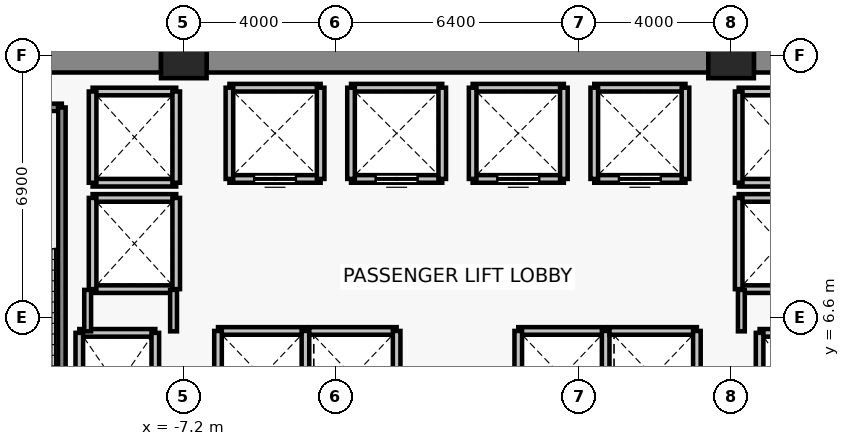
"""IFC4 building model, lengths in metres.
Left out: names, types, materials, properties, quantities, classifications, styles, units other than length and angle.
Written with IfcOpenShell. Run it as: python <this file> out.ifc"""

import sys

from ifc_helpers import new_model, si_unit, direction, frame, frame_2d, origin, origin_2d, place, context, subcontext, project, spatial, rectangle, extrude, source, transform, mapped, element, fill, save


model = new_model("IFC4")
c1 = context("Model", 3, precision=1e-05, world=origin(), true_north=direction((0.0, 1.0)))
c2 = subcontext(c1, "Body", "Model", "MODEL_VIEW")
j1 = project(units=[si_unit("LENGTHUNIT", "METRE"), si_unit("PLANEANGLEUNIT", "RADIAN")], contexts=[c1])
p1 = place(None, origin())
s1 = spatial("IfcSite", under=j1, at=p1, CompositionType="ELEMENT")
p2 = place(p1, origin())
s2 = spatial("IfcBuilding", under=s1, at=p2, CompositionType="ELEMENT")
p3 = place(p2, frame((0.0, 0.0, 13.8)))
s3 = spatial("IfcBuildingStorey", under=s2, at=p3, CompositionType="ELEMENT", Elevation=13.8)
for number, where, z_axis, x_axis in (
    (1, (-7.2, 13.5, 0.0), (0.0, 0.0, 1.0), (1.0, 0.0, 0.0)),
    (2, (7.2, 13.5, 0.0), (0.0, 0.0, 1.0), (1.0, 0.0, 0.0)),
):
    element("IfcColumn", number, at=place(p3, frame(where, z_axis=z_axis, x_axis=x_axis)), inside=s3, PredefinedType="COLUMN", context=c2, shape_type="SweptSolid", body=[
        extrude(rectangle(XDim=1.2, YDim=1.2, at=origin_2d()), origin(), (0.0, 0.0, 1.0), 4.4),
    ])
p4 = place(p3, frame((-13.8, 13.5, 0.0), z_axis=(0.0, 0.0, 1.0), x_axis=(1.0, 0.0, 0.0)))
e3 = element("IfcWall", 3, at=p4, inside=s3, PredefinedType="SHEAR", context=c2, shape_type="SweptSolid", body=[
    extrude(rectangle(XDim=6.0, YDim=0.9, at=frame_2d((3.0, 0.0))), origin(), (0.0, 0.0, 1.0), 4.1),
])
p5 = place(p3, frame((-6.6, 13.5, 0.0), z_axis=(0.0, 0.0, 1.0), x_axis=(1.0, 0.0, 0.0)))
e4 = element("IfcWall", 4, at=p5, inside=s3, PredefinedType="SHEAR", context=c2, shape_type="SweptSolid", body=[
    extrude(rectangle(XDim=13.2, YDim=0.9, at=frame_2d((6.6, 0.0))), origin(), (0.0, 0.0, 1.0), 4.1),
])
p6 = place(p3, frame((7.8, 13.5, 0.0), z_axis=(0.0, 0.0, 1.0), x_axis=(1.0, 0.0, 0.0)))
e5 = element("IfcWall", 5, at=p6, inside=s3, PredefinedType="SHEAR", context=c2, shape_type="SweptSolid", body=[
    extrude(rectangle(XDim=6.0, YDim=0.9, at=frame_2d((3.0, 0.0))), origin(), (0.0, 0.0, 1.0), 4.1),
])
p7 = place(p3, frame((-9.95, 6.2, 0.0), z_axis=(0.0, 0.0, 1.0), x_axis=(1.0, 0.0, 0.0)))
e6 = element("IfcWall", 6, at=p7, inside=s3, PredefinedType="SOLIDWALL", context=c2, shape_type="SweptSolid", body=[
    extrude(rectangle(XDim=2.0, YDim=0.2, at=frame_2d((1.0, 0.0))), origin(), (0.0, 0.0, 1.0), 4.1),
])
for number, where, z_axis, x_axis in (
    (7, (-9.95, 3.4, 0.0), (0.0, 0.0, 1.0), (0.0, 1.0, 0.0)),
    (8, (-7.95, 6.2, 0.0), (0.0, 0.0, 1.0), (0.0, -1.0, 0.0)),
):
    element("IfcWall", number, at=place(p3, frame(where, z_axis=z_axis, x_axis=x_axis)), inside=s3, PredefinedType="SOLIDWALL", context=c2, shape_type="SweptSolid", body=[
        extrude(rectangle(XDim=2.8, YDim=0.2, at=frame_2d((1.4, 0.0))), origin(), (0.0, 0.0, 1.0), 4.1),
    ])
p8 = place(p3, frame((7.95, 6.2, 0.0), z_axis=(0.0, 0.0, 1.0), x_axis=(1.0, 0.0, 0.0)))
e9 = element("IfcWall", 9, at=p8, inside=s3, PredefinedType="SOLIDWALL", context=c2, shape_type="SweptSolid", body=[
    extrude(rectangle(XDim=2.0, YDim=0.2, at=frame_2d((1.0, 0.0))), origin(), (0.0, 0.0, 1.0), 4.1),
])
p9 = place(p3, frame((7.95, 3.4, 0.0), z_axis=(0.0, 0.0, 1.0), x_axis=(0.0, 1.0, 0.0)))
e10 = element("IfcWall", 10, at=p9, inside=s3, PredefinedType="SOLIDWALL", context=c2, shape_type="SweptSolid", body=[
    extrude(rectangle(XDim=2.8, YDim=0.2, at=frame_2d((1.4, 0.0))), origin(), (0.0, 0.0, 1.0), 4.1),
])
p10 = place(p3, frame((-3.6, 10.25, 0.0), z_axis=(0.0, 0.0, 1.0), x_axis=(-1.0, 0.0, 0.0)))
e11 = element("IfcWall", 11, at=p10, inside=s3, PredefinedType="SOLIDWALL", context=c2, shape_type="SweptSolid", body=[
    extrude(rectangle(XDim=2.4, YDim=0.2, at=frame_2d((1.2, 0.0))), origin(), (0.0, 0.0, 1.0), 4.1),
])
p11 = place(p10, frame((0.65, 0.0, 0.0)))
e12 = element("IfcOpeningElement", 12, at=p11, cuts=e11, PredefinedType="OPENING", context=c2, shape_type="SweptSolid", body=[
    extrude(rectangle(XDim=1.1, YDim=2.2, at=frame_2d((0.55, 1.1))), frame((0.0, 0.11, 0.0), z_axis=(0.0, -1.0, 0.0), x_axis=(1.0, 0.0, 0.0)), (0.0, 0.0, 1.0), 0.22),
])
for number, where, z_axis, x_axis in (
    (13, (-6.0, 12.65, 0.0), (0.0, 0.0, 1.0), (1.0, 0.0, 0.0)),
    (14, (-6.0, 10.25, 0.0), (0.0, 0.0, 1.0), (0.0, 1.0, 0.0)),
    (15, (-3.6, 12.65, 0.0), (0.0, 0.0, 1.0), (0.0, -1.0, 0.0)),
):
    element("IfcWall", number, at=place(p3, frame(where, z_axis=z_axis, x_axis=x_axis)), inside=s3, PredefinedType="SOLIDWALL", context=c2, shape_type="SweptSolid", body=[
        extrude(rectangle(XDim=2.4, YDim=0.2, at=frame_2d((1.2, 0.0))), origin(), (0.0, 0.0, 1.0), 4.1),
    ])
p12 = place(p3, frame((-0.4, 10.25, 0.0), z_axis=(0.0, 0.0, 1.0), x_axis=(-1.0, 0.0, 0.0)))
e16 = element("IfcWall", 16, at=p12, inside=s3, PredefinedType="SOLIDWALL", context=c2, shape_type="SweptSolid", body=[
    extrude(rectangle(XDim=2.4, YDim=0.2, at=frame_2d((1.2, 0.0))), origin(), (0.0, 0.0, 1.0), 4.1),
])
p13 = place(p12, frame((0.65, 0.0, 0.0)))
e17 = element("IfcOpeningElement", 17, at=p13, cuts=e16, PredefinedType="OPENING", context=c2, shape_type="SweptSolid", body=[
    extrude(rectangle(XDim=1.1, YDim=2.2, at=frame_2d((0.55, 1.1))), frame((0.0, 0.11, 0.0), z_axis=(0.0, -1.0, 0.0), x_axis=(1.0, 0.0, 0.0)), (0.0, 0.0, 1.0), 0.22),
])
p14 = place(p3, frame((-2.8, 12.65, 0.0), z_axis=(0.0, 0.0, 1.0), x_axis=(1.0, 0.0, 0.0)))
e18 = element("IfcWall", 18, at=p14, inside=s3, PredefinedType="SOLIDWALL", context=c2, shape_type="SweptSolid", body=[
    extrude(rectangle(XDim=2.4, YDim=0.2, at=frame_2d((1.2, 0.0))), origin(), (0.0, 0.0, 1.0), 4.1),
])
for number, where, z_axis, x_axis in (
    (19, (-2.8, 10.25, 0.0), (0.0, 0.0, 1.0), (0.0, 1.0, 0.0)),
    (20, (-0.4, 12.65, 0.0), (0.0, 0.0, 1.0), (0.0, -1.0, 0.0)),
):
    element("IfcWall", number, at=place(p3, frame(where, z_axis=z_axis, x_axis=x_axis)), inside=s3, PredefinedType="SOLIDWALL", context=c2, shape_type="SweptSolid", body=[
        extrude(rectangle(XDim=2.4, YDim=0.2, at=frame_2d((1.2, 0.0))), origin(), (0.0, 0.0, 1.0), 4.1),
    ])
p15 = place(p3, frame((2.8, 10.25, 0.0), z_axis=(0.0, 0.0, 1.0), x_axis=(-1.0, 0.0, 0.0)))
e21 = element("IfcWall", 21, at=p15, inside=s3, PredefinedType="SOLIDWALL", context=c2, shape_type="SweptSolid", body=[
    extrude(rectangle(XDim=2.4, YDim=0.2, at=frame_2d((1.2, 0.0))), origin(), (0.0, 0.0, 1.0), 4.1),
])
p16 = place(p15, frame((0.65, 0.0, 0.0)))
e22 = element("IfcOpeningElement", 22, at=p16, cuts=e21, PredefinedType="OPENING", context=c2, shape_type="SweptSolid", body=[
    extrude(rectangle(XDim=1.1, YDim=2.2, at=frame_2d((0.55, 1.1))), frame((0.0, 0.11, 0.0), z_axis=(0.0, -1.0, 0.0), x_axis=(1.0, 0.0, 0.0)), (0.0, 0.0, 1.0), 0.22),
])
p17 = place(p3, frame((0.4, 12.65, 0.0), z_axis=(0.0, 0.0, 1.0), x_axis=(1.0, 0.0, 0.0)))
e23 = element("IfcWall", 23, at=p17, inside=s3, PredefinedType="SOLIDWALL", context=c2, shape_type="SweptSolid", body=[
    extrude(rectangle(XDim=2.4, YDim=0.2, at=frame_2d((1.2, 0.0))), origin(), (0.0, 0.0, 1.0), 4.1),
])
for number, where, z_axis, x_axis in (
    (24, (0.4, 10.25, 0.0), (0.0, 0.0, 1.0), (0.0, 1.0, 0.0)),
    (25, (2.8, 12.65, 0.0), (0.0, 0.0, 1.0), (0.0, -1.0, 0.0)),
):
    element("IfcWall", number, at=place(p3, frame(where, z_axis=z_axis, x_axis=x_axis)), inside=s3, PredefinedType="SOLIDWALL", context=c2, shape_type="SweptSolid", body=[
        extrude(rectangle(XDim=2.4, YDim=0.2, at=frame_2d((1.2, 0.0))), origin(), (0.0, 0.0, 1.0), 4.1),
    ])
p18 = place(p3, frame((6.0, 10.25, 0.0), z_axis=(0.0, 0.0, 1.0), x_axis=(-1.0, 0.0, 0.0)))
e26 = element("IfcWall", 26, at=p18, inside=s3, PredefinedType="SOLIDWALL", context=c2, shape_type="SweptSolid", body=[
    extrude(rectangle(XDim=2.4, YDim=0.2, at=frame_2d((1.2, 0.0))), origin(), (0.0, 0.0, 1.0), 4.1),
])
p19 = place(p18, frame((0.65, 0.0, 0.0)))
e27 = element("IfcOpeningElement", 27, at=p19, cuts=e26, PredefinedType="OPENING", context=c2, shape_type="SweptSolid", body=[
    extrude(rectangle(XDim=1.1, YDim=2.2, at=frame_2d((0.55, 1.1))), frame((0.0, 0.11, 0.0), z_axis=(0.0, -1.0, 0.0), x_axis=(1.0, 0.0, 0.0)), (0.0, 0.0, 1.0), 0.22),
])
for number, where, z_axis, x_axis in (
    (28, (3.6, 12.65, 0.0), (0.0, 0.0, 1.0), (1.0, 0.0, 0.0)),
    (29, (3.6, 10.25, 0.0), (0.0, 0.0, 1.0), (0.0, 1.0, 0.0)),
    (30, (6.0, 12.65, 0.0), (0.0, 0.0, 1.0), (0.0, -1.0, 0.0)),
):
    element("IfcWall", number, at=place(p3, frame(where, z_axis=z_axis, x_axis=x_axis)), inside=s3, PredefinedType="SOLIDWALL", context=c2, shape_type="SweptSolid", body=[
        extrude(rectangle(XDim=2.4, YDim=0.2, at=frame_2d((1.2, 0.0))), origin(), (0.0, 0.0, 1.0), 4.1),
    ])
p20 = place(p3, frame((-6.3, 6.25, 0.0), z_axis=(0.0, 0.0, 1.0), x_axis=(1.0, 0.0, 0.0)))
e31 = element("IfcWall", 31, at=p20, inside=s3, PredefinedType="SOLIDWALL", context=c2, shape_type="SweptSolid", body=[
    extrude(rectangle(XDim=2.3, YDim=0.2, at=frame_2d((1.15, 0.0))), origin(), (0.0, 0.0, 1.0), 4.1),
])
for number, where, z_axis, x_axis in (
    (32, (-6.3, 3.85, 0.0), (0.0, 0.0, 1.0), (0.0, 1.0, 0.0)),
    (33, (-4.0, 6.25, 0.0), (0.0, 0.0, 1.0), (0.0, -1.0, 0.0)),
):
    element("IfcWall", number, at=place(p3, frame(where, z_axis=z_axis, x_axis=x_axis)), inside=s3, PredefinedType="SOLIDWALL", context=c2, shape_type="SweptSolid", body=[
        extrude(rectangle(XDim=2.4, YDim=0.2, at=frame_2d((1.2, 0.0))), origin(), (0.0, 0.0, 1.0), 4.1),
    ])
p21 = place(p3, frame((-3.9, 6.25, 0.0), z_axis=(0.0, 0.0, 1.0), x_axis=(1.0, 0.0, 0.0)))
e34 = element("IfcWall", 34, at=p21, inside=s3, PredefinedType="SOLIDWALL", context=c2, shape_type="SweptSolid", body=[
    extrude(rectangle(XDim=2.3, YDim=0.2, at=frame_2d((1.15, 0.0))), origin(), (0.0, 0.0, 1.0), 4.1),
])
p22 = place(p3, frame((-1.6, 6.25, 0.0), z_axis=(0.0, 0.0, 1.0), x_axis=(0.0, -1.0, 0.0)))
e35 = element("IfcWall", 35, at=p22, inside=s3, PredefinedType="SOLIDWALL", context=c2, shape_type="SweptSolid", body=[
    extrude(rectangle(XDim=2.4, YDim=0.2, at=frame_2d((1.2, 0.0))), origin(), (0.0, 0.0, 1.0), 4.1),
])
p23 = place(p3, frame((1.6, 6.25, 0.0), z_axis=(0.0, 0.0, 1.0), x_axis=(1.0, 0.0, 0.0)))
e36 = element("IfcWall", 36, at=p23, inside=s3, PredefinedType="SOLIDWALL", context=c2, shape_type="SweptSolid", body=[
    extrude(rectangle(XDim=2.3, YDim=0.2, at=frame_2d((1.15, 0.0))), origin(), (0.0, 0.0, 1.0), 4.1),
])
for number, where, z_axis, x_axis in (
    (37, (1.6, 3.85, 0.0), (0.0, 0.0, 1.0), (0.0, 1.0, 0.0)),
    (38, (3.9, 6.25, 0.0), (0.0, 0.0, 1.0), (0.0, -1.0, 0.0)),
):
    element("IfcWall", number, at=place(p3, frame(where, z_axis=z_axis, x_axis=x_axis)), inside=s3, PredefinedType="SOLIDWALL", context=c2, shape_type="SweptSolid", body=[
        extrude(rectangle(XDim=2.4, YDim=0.2, at=frame_2d((1.2, 0.0))), origin(), (0.0, 0.0, 1.0), 4.1),
    ])
p24 = place(p3, frame((4.0, 6.25, 0.0), z_axis=(0.0, 0.0, 1.0), x_axis=(1.0, 0.0, 0.0)))
e39 = element("IfcWall", 39, at=p24, inside=s3, PredefinedType="SOLIDWALL", context=c2, shape_type="SweptSolid", body=[
    extrude(rectangle(XDim=2.3, YDim=0.2, at=frame_2d((1.15, 0.0))), origin(), (0.0, 0.0, 1.0), 4.1),
])
p25 = place(p3, frame((6.3, 6.25, 0.0), z_axis=(0.0, 0.0, 1.0), x_axis=(0.0, -1.0, 0.0)))
e40 = element("IfcWall", 40, at=p25, inside=s3, PredefinedType="SOLIDWALL", context=c2, shape_type="SweptSolid", body=[
    extrude(rectangle(XDim=2.4, YDim=0.2, at=frame_2d((1.2, 0.0))), origin(), (0.0, 0.0, 1.0), 4.1),
])
for number, where, z_axis, x_axis in (
    (41, (-7.4, 7.35, 0.0), (0.0, 0.0, 1.0), (-1.0, 0.0, 0.0)),
    (42, (-9.6, 9.75, 0.0), (0.0, 0.0, 1.0), (1.0, 0.0, 0.0)),
):
    element("IfcWall", number, at=place(p3, frame(where, z_axis=z_axis, x_axis=x_axis)), inside=s3, PredefinedType="SOLIDWALL", context=c2, shape_type="SweptSolid", body=[
        extrude(rectangle(XDim=2.2, YDim=0.2, at=frame_2d((1.1, 0.0))), origin(), (0.0, 0.0, 1.0), 3.19),
    ])
p26 = place(p3, frame((-9.6, 7.35, 0.0), z_axis=(0.0, 0.0, 1.0), x_axis=(0.0, 1.0, 0.0)))
e43 = element("IfcWall", 43, at=p26, inside=s3, PredefinedType="SOLIDWALL", context=c2, shape_type="SweptSolid", body=[
    extrude(rectangle(XDim=2.4, YDim=0.2, at=frame_2d((1.2, 0.0))), origin(), (0.0, 0.0, 1.0), 4.1),
])
p27 = place(p3, frame((-7.4, 9.75, 0.0), z_axis=(0.0, 0.0, 1.0), x_axis=(0.0, -1.0, 0.0)))
e44 = element("IfcWall", 44, at=p27, inside=s3, PredefinedType="SOLIDWALL", context=c2, shape_type="SweptSolid", body=[
    extrude(rectangle(XDim=2.4, YDim=0.2, at=frame_2d((1.2, 0.0))), origin(), (0.0, 0.0, 1.0), 3.19),
])
for number, where, z_axis, x_axis in (
    (45, (-7.4, 10.15, 0.0), (0.0, 0.0, 1.0), (-1.0, 0.0, 0.0)),
    (46, (-9.6, 12.55, 0.0), (0.0, 0.0, 1.0), (1.0, 0.0, 0.0)),
):
    element("IfcWall", number, at=place(p3, frame(where, z_axis=z_axis, x_axis=x_axis)), inside=s3, PredefinedType="SOLIDWALL", context=c2, shape_type="SweptSolid", body=[
        extrude(rectangle(XDim=2.2, YDim=0.2, at=frame_2d((1.1, 0.0))), origin(), (0.0, 0.0, 1.0), 3.19),
    ])
p28 = place(p3, frame((-9.6, 10.15, 0.0), z_axis=(0.0, 0.0, 1.0), x_axis=(0.0, 1.0, 0.0)))
e47 = element("IfcWall", 47, at=p28, inside=s3, PredefinedType="SOLIDWALL", context=c2, shape_type="SweptSolid", body=[
    extrude(rectangle(XDim=2.4, YDim=0.2, at=frame_2d((1.2, 0.0))), origin(), (0.0, 0.0, 1.0), 4.1),
])
p29 = place(p3, frame((-7.4, 12.55, 0.0), z_axis=(0.0, 0.0, 1.0), x_axis=(0.0, -1.0, 0.0)))
e48 = element("IfcWall", 48, at=p29, inside=s3, PredefinedType="SOLIDWALL", context=c2, shape_type="SweptSolid", body=[
    extrude(rectangle(XDim=2.4, YDim=0.2, at=frame_2d((1.2, 0.0))), origin(), (0.0, 0.0, 1.0), 3.19),
])
for number, where, z_axis, x_axis in (
    (49, (9.6, 7.35, 0.0), (0.0, 0.0, 1.0), (-1.0, 0.0, 0.0)),
    (50, (7.4, 9.75, 0.0), (0.0, 0.0, 1.0), (1.0, 0.0, 0.0)),
):
    element("IfcWall", number, at=place(p3, frame(where, z_axis=z_axis, x_axis=x_axis)), inside=s3, PredefinedType="SOLIDWALL", context=c2, shape_type="SweptSolid", body=[
        extrude(rectangle(XDim=2.2, YDim=0.2, at=frame_2d((1.1, 0.0))), origin(), (0.0, 0.0, 1.0), 3.19),
    ])
p30 = place(p3, frame((7.4, 7.35, 0.0), z_axis=(0.0, 0.0, 1.0), x_axis=(0.0, 1.0, 0.0)))
e51 = element("IfcWall", 51, at=p30, inside=s3, PredefinedType="SOLIDWALL", context=c2, shape_type="SweptSolid", body=[
    extrude(rectangle(XDim=2.4, YDim=0.2, at=frame_2d((1.2, 0.0))), origin(), (0.0, 0.0, 1.0), 3.19),
])
for number, where, z_axis, x_axis in (
    (52, (9.6, 10.15, 0.0), (0.0, 0.0, 1.0), (-1.0, 0.0, 0.0)),
    (53, (7.4, 12.55, 0.0), (0.0, 0.0, 1.0), (1.0, 0.0, 0.0)),
):
    element("IfcWall", number, at=place(p3, frame(where, z_axis=z_axis, x_axis=x_axis)), inside=s3, PredefinedType="SOLIDWALL", context=c2, shape_type="SweptSolid", body=[
        extrude(rectangle(XDim=2.2, YDim=0.2, at=frame_2d((1.1, 0.0))), origin(), (0.0, 0.0, 1.0), 3.19),
    ])
p31 = place(p3, frame((7.4, 10.15, 0.0), z_axis=(0.0, 0.0, 1.0), x_axis=(0.0, 1.0, 0.0)))
e54 = element("IfcWall", 54, at=p31, inside=s3, PredefinedType="SOLIDWALL", context=c2, shape_type="SweptSolid", body=[
    extrude(rectangle(XDim=2.4, YDim=0.2, at=frame_2d((1.2, 0.0))), origin(), (0.0, 0.0, 1.0), 3.19),
])
p32 = place(p3, frame((-13.93, 12.13, 0.0), z_axis=(0.0, 0.0, 1.0), x_axis=(1.0, 0.0, 0.0)))
e55 = element("IfcWall", 55, at=p32, inside=s3, PredefinedType="SOLIDWALL", context=c2, shape_type="SweptSolid", body=[
    extrude(rectangle(XDim=3.52, YDim=0.2, at=frame_2d((1.76, 0.0))), origin(), (0.0, 0.0, 1.0), 4.1),
])
p33 = place(p3, frame((-10.41, 12.13, 0.0), z_axis=(0.0, 0.0, 1.0), x_axis=(0.0, -1.0, 0.0)))
e56 = element("IfcWall", 56, at=p33, inside=s3, PredefinedType="SOLIDWALL", context=c2, shape_type="SweptSolid", body=[
    extrude(rectangle(XDim=8.84, YDim=0.2, at=frame_2d((4.42, 0.0))), origin(), (0.0, 0.0, 1.0), 4.1),
])
p34 = place(p3, frame((-9.73, 6.24, 0.0), z_axis=(0.0, 0.0, 1.0), x_axis=(0.0, 1.0, 0.0)))
e57 = element("IfcWall", 57, at=p34, inside=s3, PredefinedType="PARTITIONING", context=c2, shape_type="SweptSolid", body=[
    extrude(rectangle(XDim=1.09, YDim=0.18, at=frame_2d((0.545, 0.0))), origin(), (0.0, 0.0, 1.0), 4.1),
])
for number, where, z_axis, x_axis in (
    (58, (-7.47, 7.33, 0.0), (0.0, 0.0, 1.0), (0.0, -1.0, 0.0)),
    (59, (7.47, 6.24, 0.0), (0.0, 0.0, 1.0), (0.0, 1.0, 0.0)),
):
    element("IfcWall", number, at=place(p3, frame(where, z_axis=z_axis, x_axis=x_axis)), inside=s3, PredefinedType="PARTITIONING", context=c2, shape_type="SweptSolid", body=[
        extrude(rectangle(XDim=1.09, YDim=0.18, at=frame_2d((0.545, 0.0))), origin(), (0.0, 0.0, 1.0), 3.19),
    ])
m1 = source(origin(), c2, "Body", "SweptSolid", [
    extrude(rectangle(XDim=1.1, YDim=2.2, at=frame_2d((0.55, 1.1))), frame((0.0, 0.025, 0.0), z_axis=(0.0, -1.0, 0.0), x_axis=(1.0, 0.0, 0.0)), (0.0, 0.0, 1.0), 0.05),
])
p35 = place(p11, origin())
e60 = element("IfcDoor", 60, at=p35, inside=s3, OperationType="DOUBLE_DOOR_SLIDING", PredefinedType="DOOR", context=c2, shape_type="MappedRepresentation", body=[
    mapped(m1, transform((0.0, 0.0, 0.0), x_axis=(1.0, 0.0, 0.0), y_axis=(0.0, 1.0, 0.0), z_axis=(0.0, 0.0, 1.0), scale=1.0)),
])
fill(e12, e60)
p36 = place(p13, origin())
e61 = element("IfcDoor", 61, at=p36, inside=s3, OperationType="DOUBLE_DOOR_SLIDING", PredefinedType="DOOR", context=c2, shape_type="MappedRepresentation", body=[
    mapped(m1, transform((0.0, 0.0, 0.0), x_axis=(1.0, 0.0, 0.0), y_axis=(0.0, 1.0, 0.0), z_axis=(0.0, 0.0, 1.0), scale=1.0)),
])
fill(e17, e61)
p37 = place(p16, origin())
e62 = element("IfcDoor", 62, at=p37, inside=s3, OperationType="DOUBLE_DOOR_SLIDING", PredefinedType="DOOR", context=c2, shape_type="MappedRepresentation", body=[
    mapped(m1, transform((0.0, 0.0, 0.0), x_axis=(1.0, 0.0, 0.0), y_axis=(0.0, 1.0, 0.0), z_axis=(0.0, 0.0, 1.0), scale=1.0)),
])
fill(e22, e62)
p38 = place(p19, origin())
e63 = element("IfcDoor", 63, at=p38, inside=s3, OperationType="DOUBLE_DOOR_SLIDING", PredefinedType="DOOR", context=c2, shape_type="MappedRepresentation", body=[
    mapped(m1, transform((0.0, 0.0, 0.0), x_axis=(1.0, 0.0, 0.0), y_axis=(0.0, 1.0, 0.0), z_axis=(0.0, 0.0, 1.0), scale=1.0)),
])
fill(e27, e63)
save(model, sys.argv[1])
